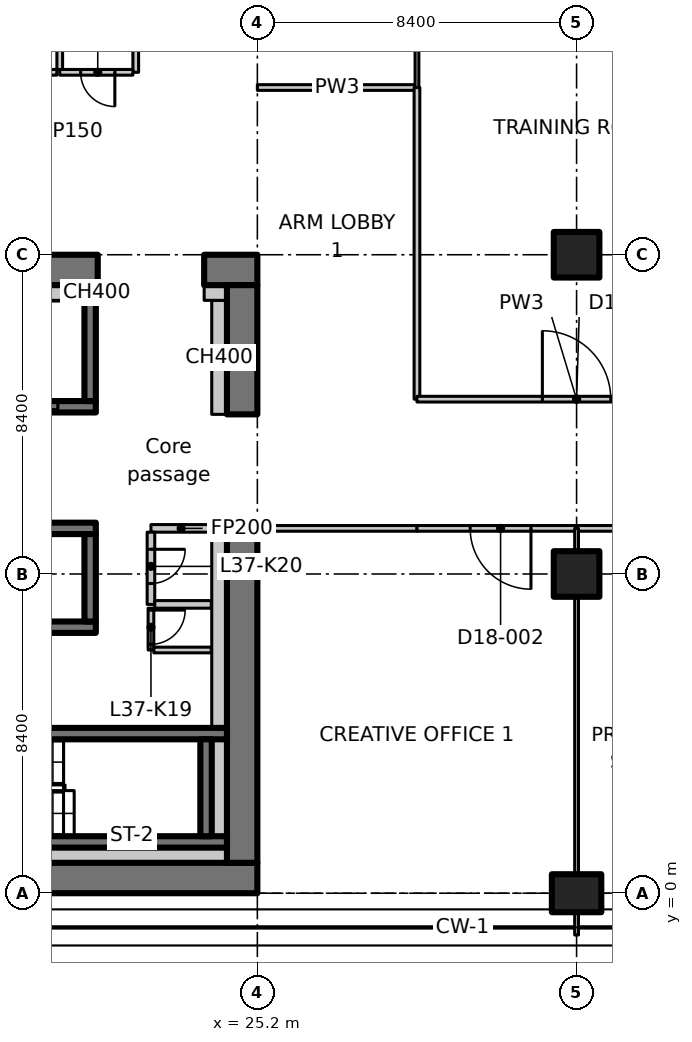
"""IFC4 building model, lengths in metres.
Left out: names, types, materials, properties, quantities, classifications, styles, units other than length and angle.
Written with IfcOpenShell. Run it as: python <this file> out.ifc"""

import sys

from ifc_helpers import new_model, si_unit, direction, frame, frame_2d, origin, origin_2d, place, context, subcontext, project, spatial, polyline, rectangle, outline, extrude, element, fill, save


model = new_model("IFC4")
c1 = context("Model", 3, precision=1e-05, world=origin(), true_north=direction((0.0, 1.0)))
c2 = subcontext(c1, "Body", "Model", "MODEL_VIEW")
j1 = project(units=[si_unit("LENGTHUNIT", "METRE"), si_unit("PLANEANGLEUNIT", "RADIAN")], contexts=[c1])
p1 = place(None, origin())
s1 = spatial("IfcSite", under=j1, at=p1, CompositionType="ELEMENT")
p2 = place(p1, origin())
s2 = spatial("IfcBuilding", under=s1, at=p2, CompositionType="ELEMENT")
p3 = place(p2, frame((0.0, 0.0, 149.3)))
s3 = spatial("IfcBuildingStorey", under=s2, at=p3, CompositionType="ELEMENT", Elevation=149.3)
p4 = place(p3, frame((33.6, 0.0, 0.0), z_axis=(0.0, 0.0, 1.0), x_axis=(0.0, 1.0, 0.0)))
e1 = element("IfcColumn", 1, at=p4, inside=s3, PredefinedType="COLUMN", context=c2, shape_type="SweptSolid", body=[
    extrude(rectangle(XDim=1.0, YDim=1.3, at=origin_2d()), origin(), (0.0, 0.0, 1.0), 3.35),
])
for number, where, z_axis, x_axis in (
    (2, (33.6, 8.4, 0.0), (0.0, 0.0, 1.0), (1.0, 0.0, 0.0)),
    (3, (33.6, 16.8, 0.0), (0.0, 0.0, 1.0), (1.0, 0.0, 0.0)),
):
    element("IfcColumn", number, at=place(p3, frame(where, z_axis=z_axis, x_axis=x_axis)), inside=s3, PredefinedType="COLUMN", context=c2, shape_type="SweptSolid", body=[
        extrude(rectangle(XDim=1.2, YDim=1.2, at=origin_2d()), origin(), (0.0, 0.0, 1.0), 3.35),
    ])
p5 = place(p3, frame((7.136, 0.4, 0.0), z_axis=(0.0, 0.0, 1.0), x_axis=(1.0, 0.0, 0.0)))
e4 = element("IfcWall", 4, at=p5, inside=s3, PredefinedType="SHEAR", context=c2, shape_type="SweptSolid", body=[
    extrude(rectangle(XDim=18.063, YDim=0.8, at=frame_2d((9.032, 0.0))), origin(), (0.0, 0.0, 1.0), 3.35),
])
p6 = place(p3, frame((-1.1, 16.4, 0.0), z_axis=(0.0, 0.0, 1.0), x_axis=(1.0, 0.0, 0.0)))
e5 = element("IfcWall", 5, at=p6, inside=s3, PredefinedType="SHEAR", context=c2, shape_type="SweptSolid", body=[
    extrude(rectangle(XDim=22.1, YDim=0.8, at=frame_2d((11.05, 0.0))), origin(), (0.0, 0.0, 1.0), 3.35),
])
p7 = place(p6, frame((3.15, 0.0, 0.0)))
e6 = element("IfcOpeningElement", 6, at=p7, cuts=e5, PredefinedType="OPENING", context=c2, shape_type="SweptSolid", body=[
    extrude(rectangle(XDim=1.1, YDim=2.3, at=frame_2d((0.55, 1.15))), frame((0.0, 0.41, 0.0), z_axis=(0.0, -1.0, 0.0), x_axis=(1.0, 0.0, 0.0)), (0.0, 0.0, 1.0), 0.82),
])
p8 = place(p3, frame((23.8, 16.4, 0.0), z_axis=(0.0, 0.0, 1.0), x_axis=(1.0, 0.0, 0.0)))
e7 = element("IfcWall", 7, at=p8, inside=s3, PredefinedType="SHEAR", context=c2, shape_type="SweptSolid", body=[
    extrude(rectangle(XDim=1.4, YDim=0.8, at=frame_2d((0.7, 0.0))), origin(), (0.0, 0.0, 1.0), 3.35),
])
p9 = place(p3, frame((24.8, 0.8, 0.0), z_axis=(0.0, 0.0, 1.0), x_axis=(0.0, 1.0, 0.0)))
e8 = element("IfcWall", 8, at=p9, inside=s3, PredefinedType="SHEAR", context=c2, shape_type="SweptSolid", body=[
    extrude(rectangle(XDim=9.0, YDim=0.8, at=frame_2d((4.5, 0.0))), origin(), (0.0, 0.0, 1.0), 3.35),
])
p10 = place(p3, frame((24.8, 12.6, 0.0), z_axis=(0.0, 0.0, 1.0), x_axis=(0.0, 1.0, 0.0)))
e9 = element("IfcWall", 9, at=p10, inside=s3, PredefinedType="SHEAR", context=c2, shape_type="SweptSolid", body=[
    extrude(rectangle(XDim=3.4, YDim=0.8, at=frame_2d((1.7, 0.0))), origin(), (0.0, 0.0, 1.0), 3.35),
])
p11 = place(p3, frame((24.2, 12.6, 0.0), z_axis=(0.0, 0.0, 1.0), x_axis=(0.0, 1.0, 0.0)))
e10 = element("IfcWall", 10, at=p11, inside=s3, PredefinedType="PARTITIONING", context=c2, shape_type="SweptSolid", body=[
    extrude(rectangle(XDim=3.0, YDim=0.4, at=frame_2d((1.5, 0.0))), origin(), (0.0, 0.0, 1.0), 3.35),
])
p12 = place(p3, frame((23.8, 15.8, 0.0), z_axis=(0.0, 0.0, 1.0), x_axis=(1.0, 0.0, 0.0)))
e11 = element("IfcWall", 11, at=p12, inside=s3, PredefinedType="PARTITIONING", context=c2, shape_type="SweptSolid", body=[
    extrude(rectangle(XDim=0.6, YDim=0.4, at=frame_2d((0.3, 0.0))), origin(), (0.0, 0.0, 1.0), 3.35),
])
p13 = place(p3, frame((0.8, 7.0, 0.0), z_axis=(0.0, 0.0, 1.0), x_axis=(1.0, 0.0, 0.0)))
e12 = element("IfcWall", 12, at=p13, inside=s3, PredefinedType="SHEAR", context=c2, shape_type="SweptSolid", body=[
    extrude(rectangle(XDim=20.15, YDim=0.3, at=frame_2d((10.075, 0.0))), origin(), (0.0, 0.0, 1.0), 3.35),
])
p14 = place(p3, frame((0.8, 9.6, 0.0), z_axis=(0.0, 0.0, 1.0), x_axis=(1.0, 0.0, 0.0)))
e13 = element("IfcWall", 13, at=p14, inside=s3, PredefinedType="SHEAR", context=c2, shape_type="SweptSolid", body=[
    extrude(rectangle(XDim=20.15, YDim=0.3, at=frame_2d((10.075, 0.0))), origin(), (0.0, 0.0, 1.0), 3.35),
])
p15 = place(p14, frame((1.25, 0.0, 0.0)))
e14 = element("IfcOpeningElement", 14, at=p15, cuts=e13, PredefinedType="OPENING", context=c2, shape_type="SweptSolid", body=[
    extrude(rectangle(XDim=1.1, YDim=2.3, at=frame_2d((0.55, 1.15))), frame((0.0, 0.16, 0.0), z_axis=(0.0, -1.0, 0.0), x_axis=(1.0, 0.0, 0.0)), (0.0, 0.0, 1.0), 0.32),
])
p16 = place(p14, frame((4.05, 0.0, 0.0)))
e15 = element("IfcOpeningElement", 15, at=p16, cuts=e13, PredefinedType="OPENING", context=c2, shape_type="SweptSolid", body=[
    extrude(rectangle(XDim=1.1, YDim=2.3, at=frame_2d((0.55, 1.15))), frame((0.0, 0.16, 0.0), z_axis=(0.0, -1.0, 0.0), x_axis=(1.0, 0.0, 0.0)), (0.0, 0.0, 1.0), 0.32),
])
p17 = place(p14, frame((6.85, 0.0, 0.0)))
e16 = element("IfcOpeningElement", 16, at=p17, cuts=e13, PredefinedType="OPENING", context=c2, shape_type="SweptSolid", body=[
    extrude(rectangle(XDim=1.1, YDim=2.3, at=frame_2d((0.55, 1.15))), frame((0.0, 0.16, 0.0), z_axis=(0.0, -1.0, 0.0), x_axis=(1.0, 0.0, 0.0)), (0.0, 0.0, 1.0), 0.32),
])
p18 = place(p14, frame((9.65, 0.0, 0.0)))
e17 = element("IfcOpeningElement", 17, at=p18, cuts=e13, PredefinedType="OPENING", context=c2, shape_type="SweptSolid", body=[
    extrude(rectangle(XDim=1.1, YDim=2.3, at=frame_2d((0.55, 1.15))), frame((0.0, 0.16, 0.0), z_axis=(0.0, -1.0, 0.0), x_axis=(1.0, 0.0, 0.0)), (0.0, 0.0, 1.0), 0.32),
])
p19 = place(p14, frame((12.45, 0.0, 0.0)))
e18 = element("IfcOpeningElement", 18, at=p19, cuts=e13, PredefinedType="OPENING", context=c2, shape_type="SweptSolid", body=[
    extrude(rectangle(XDim=1.1, YDim=2.3, at=frame_2d((0.55, 1.15))), frame((0.0, 0.16, 0.0), z_axis=(0.0, -1.0, 0.0), x_axis=(1.0, 0.0, 0.0)), (0.0, 0.0, 1.0), 0.32),
])
p20 = place(p14, frame((15.25, 0.0, 0.0)))
e19 = element("IfcOpeningElement", 19, at=p20, cuts=e13, PredefinedType="OPENING", context=c2, shape_type="SweptSolid", body=[
    extrude(rectangle(XDim=1.1, YDim=2.3, at=frame_2d((0.55, 1.15))), frame((0.0, 0.16, 0.0), z_axis=(0.0, -1.0, 0.0), x_axis=(1.0, 0.0, 0.0)), (0.0, 0.0, 1.0), 0.32),
])
p21 = place(p3, frame((20.8, 7.15, 0.0), z_axis=(0.0, 0.0, 1.0), x_axis=(0.0, 1.0, 0.0)))
e20 = element("IfcWall", 20, at=p21, inside=s3, PredefinedType="SHEAR", context=c2, shape_type="SweptSolid", body=[
    extrude(rectangle(XDim=2.3, YDim=0.3, at=frame_2d((1.15, 0.0))), origin(), (0.0, 0.0, 1.0), 3.35),
])
p22 = place(p3, frame((15.05, 12.8, 0.0), z_axis=(0.0, 0.0, 1.0), x_axis=(1.0, 0.0, 0.0)))
e21 = element("IfcWall", 21, at=p22, inside=s3, PredefinedType="SHEAR", context=c2, shape_type="SweptSolid", body=[
    extrude(rectangle(XDim=5.9, YDim=0.3, at=frame_2d((2.95, 0.0))), origin(), (0.0, 0.0, 1.0), 3.35),
])
p23 = place(p22, frame((3.8, 0.0, 0.0)))
e22 = element("IfcOpeningElement", 22, at=p23, cuts=e21, PredefinedType="OPENING", context=c2, shape_type="SweptSolid", body=[
    extrude(rectangle(XDim=1.1, YDim=2.3, at=frame_2d((0.55, 1.15))), frame((0.0, 0.16, 0.0), z_axis=(0.0, -1.0, 0.0), x_axis=(1.0, 0.0, 0.0)), (0.0, 0.0, 1.0), 0.32),
])
p24 = place(p3, frame((20.8, 12.95, 0.0), z_axis=(0.0, 0.0, 1.0), x_axis=(0.0, 1.0, 0.0)))
e23 = element("IfcWall", 23, at=p24, inside=s3, PredefinedType="SHEAR", context=c2, shape_type="SweptSolid", body=[
    extrude(rectangle(XDim=3.05, YDim=0.3, at=frame_2d((1.525, 0.0))), origin(), (0.0, 0.0, 1.0), 3.35),
])
p25 = place(p3, frame((15.8, 1.35, 0.0), z_axis=(0.0, 0.0, 1.0), x_axis=(1.0, 0.0, 0.0)))
e24 = element("IfcWall", 24, at=p25, inside=s3, PredefinedType="SHEAR", context=c2, shape_type="SweptSolid", body=[
    extrude(rectangle(XDim=8.6, YDim=0.3, at=frame_2d((4.3, 0.0))), origin(), (0.0, 0.0, 1.0), 3.35),
])
p26 = place(p3, frame((15.8, 4.2, 0.0), z_axis=(0.0, 0.0, 1.0), x_axis=(1.0, 0.0, 0.0)))
e25 = element("IfcWall", 25, at=p26, inside=s3, PredefinedType="SHEAR", context=c2, shape_type="SweptSolid", body=[
    extrude(rectangle(XDim=8.6, YDim=0.3, at=frame_2d((4.3, 0.0))), origin(), (0.0, 0.0, 1.0), 3.35),
])
p27 = place(p26, frame((0.4, 0.0, 0.0)))
e26 = element("IfcOpeningElement", 26, at=p27, cuts=e25, PredefinedType="OPENING", context=c2, shape_type="SweptSolid", body=[
    extrude(rectangle(XDim=1.0, YDim=2.1, at=frame_2d((0.5, 1.05))), frame((0.0, 0.16, 0.0), z_axis=(0.0, -1.0, 0.0), x_axis=(1.0, 0.0, 0.0)), (0.0, 0.0, 1.0), 0.32),
])
p28 = place(p3, frame((23.85, 1.5, 0.0), z_axis=(0.0, 0.0, 1.0), x_axis=(0.0, 1.0, 0.0)))
e27 = element("IfcWall", 27, at=p28, inside=s3, PredefinedType="SHEAR", context=c2, shape_type="SweptSolid", body=[
    extrude(rectangle(XDim=2.55, YDim=0.3, at=frame_2d((1.275, 0.0))), origin(), (0.0, 0.0, 1.0), 3.35),
])
p29 = place(p3, frame((23.988, 9.6, 0.0), z_axis=(0.0, 0.0, 1.0), x_axis=(-1.0, 0.0, 0.0)))
e28 = element("IfcWall", 28, at=p29, inside=s3, PredefinedType="PARTITIONING", context=c2, shape_type="SweptSolid", body=[
    extrude(rectangle(XDim=1.588, YDim=0.2, at=frame_2d((0.794, 0.0))), origin(), (0.0, 0.0, 1.0), 3.35),
])
p30 = place(p3, frame((22.4, 9.5, 0.0), z_axis=(0.0, 0.0, 1.0), x_axis=(0.0, -1.0, 0.0)))
e29 = element("IfcWall", 29, at=p30, inside=s3, PredefinedType="PARTITIONING", context=c2, shape_type="SweptSolid", body=[
    extrude(rectangle(XDim=1.9, YDim=0.2, at=frame_2d((0.95, 0.0))), origin(), (0.0, 0.0, 1.0), 3.35),
])
p31 = place(p30, frame((0.45, 0.0, 0.0)))
e30 = element("IfcOpeningElement", 30, at=p31, cuts=e29, PredefinedType="OPENING", context=c2, shape_type="SweptSolid", body=[
    extrude(rectangle(XDim=0.9, YDim=2.1, at=frame_2d((0.45, 1.05))), frame((0.0, 0.11, 0.0), z_axis=(0.0, -1.0, 0.0), x_axis=(1.0, 0.0, 0.0)), (0.0, 0.0, 1.0), 0.22),
])
p32 = place(p3, frame((22.5, 7.6, 0.0), z_axis=(0.0, 0.0, 1.0), x_axis=(1.0, 0.0, 0.0)))
e31 = element("IfcWall", 31, at=p32, inside=s3, PredefinedType="PARTITIONING", context=c2, shape_type="SweptSolid", body=[
    extrude(rectangle(XDim=1.488, YDim=0.2, at=frame_2d((0.744, 0.0))), origin(), (0.0, 0.0, 1.0), 3.35),
])
p33 = place(p3, frame((22.0, 23.925, 0.0), z_axis=(0.0, 0.0, 1.0), x_axis=(0.0, -1.0, 0.0)))
e32 = element("IfcWall", 32, at=p33, inside=s3, PredefinedType="PARTITIONING", context=c2, shape_type="SweptSolid", body=[
    extrude(rectangle(XDim=2.325, YDim=0.15, at=frame_2d((1.163, 0.0))), origin(), (0.0, 0.0, 1.0), 3.35),
])
p34 = place(p3, frame((21.925, 21.6, 0.0), z_axis=(0.0, 0.0, 1.0), x_axis=(-1.0, 0.0, 0.0)))
e33 = element("IfcWall", 33, at=p34, inside=s3, PredefinedType="PARTITIONING", context=c2, shape_type="SweptSolid", body=[
    extrude(rectangle(XDim=1.925, YDim=0.15, at=frame_2d((0.962, 0.0))), origin(), (0.0, 0.0, 1.0), 3.35),
])
p35 = place(p34, frame((0.475, 0.0, 0.0)))
e34 = element("IfcOpeningElement", 34, at=p35, cuts=e33, PredefinedType="OPENING", context=c2, shape_type="SweptSolid", body=[
    extrude(rectangle(XDim=0.9, YDim=2.1, at=frame_2d((0.45, 1.05))), frame((0.0, 0.085, 0.0), z_axis=(0.0, -1.0, 0.0), x_axis=(1.0, 0.0, 0.0)), (0.0, 0.0, 1.0), 0.17),
])
p36 = place(p3, frame((20.0, 21.675, 0.0), z_axis=(0.0, 0.0, 1.0), x_axis=(0.0, 1.0, 0.0)))
e35 = element("IfcWall", 35, at=p36, inside=s3, PredefinedType="PARTITIONING", context=c2, shape_type="SweptSolid", body=[
    extrude(rectangle(XDim=2.25, YDim=0.15, at=frame_2d((1.125, 0.0))), origin(), (0.0, 0.0, 1.0), 3.35),
])
p37 = place(p3, frame((19.925, 21.6, 0.0), z_axis=(0.0, 0.0, 1.0), x_axis=(-1.0, 0.0, 0.0)))
e36 = element("IfcWall", 36, at=p37, inside=s3, PredefinedType="PARTITIONING", context=c2, shape_type="SweptSolid", body=[
    extrude(rectangle(XDim=2.325, YDim=0.15, at=frame_2d((1.163, 0.0))), origin(), (0.0, 0.0, 1.0), 3.35),
])
p38 = place(p37, frame((0.675, 0.0, 0.0)))
e37 = element("IfcOpeningElement", 37, at=p38, cuts=e36, PredefinedType="OPENING", context=c2, shape_type="SweptSolid", body=[
    extrude(rectangle(XDim=0.9, YDim=2.1, at=frame_2d((0.45, 1.05))), frame((0.0, 0.085, 0.0), z_axis=(0.0, -1.0, 0.0), x_axis=(1.0, 0.0, 0.0)), (0.0, 0.0, 1.0), 0.17),
])
p39 = place(p3, frame((22.4, 7.5, 0.0), z_axis=(0.0, 0.0, 1.0), x_axis=(0.0, -1.0, 0.0)))
e38 = element("IfcWall", 38, at=p39, inside=s3, PredefinedType="PARTITIONING", context=c2, shape_type="SweptSolid", body=[
    extrude(rectangle(XDim=1.1, YDim=0.15, at=frame_2d((0.55, 0.0))), origin(), (0.0, 0.0, 1.0), 3.35),
])
p40 = place(p39, frame((0.05, 0.0, 0.0)))
e39 = element("IfcOpeningElement", 39, at=p40, cuts=e38, PredefinedType="OPENING", context=c2, shape_type="SweptSolid", body=[
    extrude(rectangle(XDim=0.9, YDim=2.1, at=frame_2d((0.45, 1.05))), frame((0.0, 0.085, 0.0), z_axis=(0.0, -1.0, 0.0), x_axis=(1.0, 0.0, 0.0)), (0.0, 0.0, 1.0), 0.17),
])
p41 = place(p3, frame((22.475, 6.4, 0.0), z_axis=(0.0, 0.0, 1.0), x_axis=(1.0, 0.0, 0.0)))
e40 = element("IfcWall", 40, at=p41, inside=s3, PredefinedType="PARTITIONING", context=c2, shape_type="SweptSolid", body=[
    extrude(rectangle(XDim=1.513, YDim=0.15, at=frame_2d((0.756, 0.0))), origin(), (0.0, 0.0, 1.0), 3.35),
])
p42 = place(p3, frame((18.15, 15.8, 0.0), z_axis=(0.0, 0.0, 1.0), x_axis=(1.0, 0.0, 0.0)))
e41 = element("IfcWall", 41, at=p42, inside=s3, PredefinedType="PARTITIONING", context=c2, shape_type="SweptSolid", body=[
    extrude(rectangle(XDim=2.5, YDim=0.4, at=frame_2d((1.25, 0.0))), origin(), (0.0, 0.0, 1.0), 3.35),
])
p43 = place(p3, frame((20.95, 15.8, 0.0), z_axis=(0.0, 0.0, 1.0), x_axis=(1.0, 0.0, 0.0)))
e42 = element("IfcWall", 42, at=p43, inside=s3, PredefinedType="PARTITIONING", context=c2, shape_type="SweptSolid", body=[
    extrude(rectangle(XDim=0.05, YDim=0.4, at=frame_2d((0.025, 0.0))), origin(), (0.0, 0.0, 1.0), 3.35),
])
p44 = place(p3, frame((13.35, 1.0, 0.0), z_axis=(0.0, 0.0, 1.0), x_axis=(1.0, 0.0, 0.0)))
e43 = element("IfcWall", 43, at=p44, inside=s3, PredefinedType="PARTITIONING", context=c2, shape_type="SweptSolid", body=[
    extrude(rectangle(XDim=11.05, YDim=0.4, at=frame_2d((5.525, 0.0))), origin(), (0.0, 0.0, 1.0), 3.35),
])
p45 = place(p3, frame((24.2, 1.5, 0.0), z_axis=(0.0, 0.0, 1.0), x_axis=(0.0, 1.0, 0.0)))
e44 = element("IfcWall", 44, at=p45, inside=s3, PredefinedType="PARTITIONING", context=c2, shape_type="SweptSolid", body=[
    extrude(rectangle(XDim=2.55, YDim=0.4, at=frame_2d((1.275, 0.0))), origin(), (0.0, 0.0, 1.0), 3.35),
])
p46 = place(p3, frame((24.2, 4.35, 0.0), z_axis=(0.0, 0.0, 1.0), x_axis=(0.0, 1.0, 0.0)))
e45 = element("IfcWall", 45, at=p46, inside=s3, PredefinedType="PARTITIONING", context=c2, shape_type="SweptSolid", body=[
    extrude(rectangle(XDim=5.45, YDim=0.4, at=frame_2d((2.725, 0.0))), origin(), (0.0, 0.0, 1.0), 3.35),
])
for number, where, z_axis, x_axis in (
    (46, (25.2, 21.2, 0.0), (0.0, 0.0, 1.0), (1.0, 0.0, 0.0)),
    (47, (29.4, 9.6, 0.0), (0.0, 0.0, 1.0), (-1.0, 0.0, 0.0)),
):
    element("IfcWall", number, at=place(p3, frame(where, z_axis=z_axis, x_axis=x_axis)), inside=s3, PredefinedType="PARTITIONING", context=c2, shape_type="SweptSolid", body=[
        extrude(rectangle(XDim=4.2, YDim=0.15, at=frame_2d((2.1, 0.0))), origin(), (0.0, 0.0, 1.0), 3.33),
    ])
p47 = place(p3, frame((29.4, 21.2, 0.0), z_axis=(0.0, 0.0, 1.0), x_axis=(0.0, -1.0, 0.0)))
e48 = element("IfcWall", 48, at=p47, inside=s3, PredefinedType="PARTITIONING", context=c2, shape_type="SweptSolid", body=[
    extrude(rectangle(XDim=8.2, YDim=0.15, at=frame_2d((4.1, 0.0))), origin(), (0.0, 0.0, 1.0), 3.33),
])
p48 = place(p3, frame((29.4, 27.511, 0.0), z_axis=(0.0, 0.0, 1.0), x_axis=(0.0, -1.0, 0.0)))
e49 = element("IfcWall", 49, at=p48, inside=s3, PredefinedType="PARTITIONING", context=c2, shape_type="SweptSolid", body=[
    extrude(outline(polyline([(0.0, 0.0), (6.311, 0.0), (6.311, 3.33), (2.761, 3.33), (2.759, 2.98), (1.863, 2.98), (1.861, 3.33), (0.236, 3.33), (0.0, 3.33), (0.0, 0.0)])), frame((0.0, 0.05, 0.0), z_axis=(0.0, -1.0, 0.0), x_axis=(1.0, 0.0, 0.0)), (0.0, 0.0, 1.0), 0.1),
])
p49 = place(p3, frame((33.6, 9.6, 0.0), z_axis=(0.0, 0.0, 1.0), x_axis=(-1.0, 0.0, 0.0)))
e50 = element("IfcWall", 50, at=p49, inside=s3, PredefinedType="PARTITIONING", context=c2, shape_type="SweptSolid", body=[
    extrude(rectangle(XDim=4.2, YDim=0.15, at=frame_2d((2.1, 0.0))), origin(), (0.0, 0.0, 1.0), 3.33),
])
p50 = place(p49, frame((1.2, 0.0, 0.0)))
e51 = element("IfcOpeningElement", 51, at=p50, cuts=e50, PredefinedType="OPENING", context=c2, shape_type="SweptSolid", body=[
    extrude(rectangle(XDim=1.6, YDim=2.1, at=frame_2d((0.8, 1.05))), frame((0.0, 0.085, 0.0), z_axis=(0.0, -1.0, 0.0), x_axis=(1.0, 0.0, 0.0)), (0.0, 0.0, 1.0), 0.17),
])
p51 = place(p3, frame((37.8, 9.6, 0.0), z_axis=(0.0, 0.0, 1.0), x_axis=(-1.0, 0.0, 0.0)))
e52 = element("IfcWall", 52, at=p51, inside=s3, PredefinedType="PARTITIONING", context=c2, shape_type="SweptSolid", body=[
    extrude(rectangle(XDim=4.2, YDim=0.15, at=frame_2d((2.1, 0.0))), origin(), (0.0, 0.0, 1.0), 3.33),
])
p52 = place(p51, frame((1.5, 0.0, 0.0)))
e53 = element("IfcOpeningElement", 53, at=p52, cuts=e52, PredefinedType="OPENING", context=c2, shape_type="SweptSolid", body=[
    extrude(rectangle(XDim=1.1, YDim=2.1, at=frame_2d((0.55, 1.05))), frame((0.0, 0.085, 0.0), z_axis=(0.0, -1.0, 0.0), x_axis=(1.0, 0.0, 0.0)), (0.0, 0.0, 1.0), 0.17),
])
p53 = place(p3, frame((29.4, 13.0, 0.0), z_axis=(0.0, 0.0, 1.0), x_axis=(1.0, 0.0, 0.0)))
e54 = element("IfcWall", 54, at=p53, inside=s3, PredefinedType="PARTITIONING", context=c2, shape_type="SweptSolid", body=[
    extrude(rectangle(XDim=8.4, YDim=0.15, at=frame_2d((4.2, 0.0))), origin(), (0.0, 0.0, 1.0), 3.33),
])
p54 = place(p53, frame((3.3, 0.0, 0.0)))
e55 = element("IfcOpeningElement", 55, at=p54, cuts=e54, PredefinedType="OPENING", context=c2, shape_type="SweptSolid", body=[
    extrude(rectangle(XDim=1.8, YDim=2.1, at=frame_2d((0.9, 1.05))), frame((0.0, 0.085, 0.0), z_axis=(0.0, -1.0, 0.0), x_axis=(1.0, 0.0, 0.0)), (0.0, 0.0, 1.0), 0.17),
])
p55 = place(p3, frame((33.6, 9.6, 0.0), z_axis=(0.0, 0.0, 1.0), x_axis=(0.0, -1.0, 0.0)))
e56 = element("IfcWall", 56, at=p55, inside=s3, PredefinedType="PARTITIONING", context=c2, shape_type="SweptSolid", body=[
    extrude(rectangle(XDim=0.58, YDim=0.1, at=frame_2d((0.29, 0.0))), origin(), (0.0, 0.0, 1.0), 3.33),
])
p56 = place(p3, frame((33.6, 7.78, 0.0), z_axis=(0.0, 0.0, 1.0), x_axis=(0.0, -1.0, 0.0)))
e57 = element("IfcWall", 57, at=p56, inside=s3, PredefinedType="PARTITIONING", context=c2, shape_type="SweptSolid", body=[
    extrude(rectangle(XDim=7.26, YDim=0.1, at=frame_2d((3.63, 0.0))), origin(), (0.0, 0.0, 1.0), 3.33),
])
p57 = place(p3, frame((33.6, -0.52, 0.0), z_axis=(0.0, 0.0, 1.0), x_axis=(0.0, -1.0, 0.0)))
e58 = element("IfcWall", 58, at=p57, inside=s3, PredefinedType="PARTITIONING", context=c2, shape_type="SweptSolid", body=[
    extrude(rectangle(XDim=0.58, YDim=0.1, at=frame_2d((0.29, 0.0))), origin(), (0.0, 0.0, 1.0), 3.33),
])
p58 = place(p23, origin())
e59 = element("IfcDoor", 59, at=p58, inside=s3, OperationType="SLIDING_TO_LEFT", PredefinedType="DOOR", context=c2, shape_type="SweptSolid", body=[
    extrude(rectangle(XDim=1.1, YDim=2.3, at=frame_2d((0.55, 1.15))), frame((0.0, 0.025, 0.0), z_axis=(0.0, -1.0, 0.0), x_axis=(1.0, 0.0, 0.0)), (0.0, 0.0, 1.0), 0.05),
])
fill(e22, e59)
p59 = place(p40, origin())
e60 = element("IfcDoor", 60, at=p59, inside=s3, OperationType="SINGLE_SWING_LEFT", PredefinedType="DOOR", context=c2, shape_type="SweptSolid", body=[
    extrude(rectangle(XDim=0.9, YDim=2.1, at=frame_2d((0.45, 1.05))), frame((0.0, 0.025, 0.0), z_axis=(0.0, -1.0, 0.0), x_axis=(1.0, 0.0, 0.0)), (0.0, 0.0, 1.0), 0.05),
])
fill(e39, e60)
p60 = place(p31, origin())
e61 = element("IfcDoor", 61, at=p60, inside=s3, OperationType="SINGLE_SWING_RIGHT", PredefinedType="DOOR", context=c2, shape_type="SweptSolid", body=[
    extrude(rectangle(XDim=0.9, YDim=2.1, at=frame_2d((0.45, 1.05))), frame((0.0, 0.025, 0.0), z_axis=(0.0, -1.0, 0.0), x_axis=(1.0, 0.0, 0.0)), (0.0, 0.0, 1.0), 0.05),
])
fill(e30, e61)
p61 = place(p35, origin())
e62 = element("IfcDoor", 62, at=p61, inside=s3, OperationType="SINGLE_SWING_RIGHT", PredefinedType="DOOR", context=c2, shape_type="SweptSolid", body=[
    extrude(rectangle(XDim=0.9, YDim=2.1, at=frame_2d((0.45, 1.05))), frame((0.0, 0.025, 0.0), z_axis=(0.0, -1.0, 0.0), x_axis=(1.0, 0.0, 0.0)), (0.0, 0.0, 1.0), 0.05),
])
fill(e34, e62)
p62 = place(p50, origin())
e63 = element("IfcDoor", 63, at=p62, inside=s3, OperationType="DOUBLE_DOOR_SINGLE_SWING", PredefinedType="DOOR", context=c2, shape_type="SweptSolid", body=[
    extrude(rectangle(XDim=1.6, YDim=2.1, at=frame_2d((0.8, 1.05))), frame((0.0, 0.025, 0.0), z_axis=(0.0, -1.0, 0.0), x_axis=(1.0, 0.0, 0.0)), (0.0, 0.0, 1.0), 0.05),
])
fill(e51, e63)
p63 = place(p54, origin())
e64 = element("IfcDoor", 64, at=p63, inside=s3, OperationType="DOUBLE_DOOR_SINGLE_SWING", PredefinedType="DOOR", context=c2, shape_type="SweptSolid", body=[
    extrude(rectangle(XDim=1.8, YDim=2.1, at=frame_2d((0.9, 1.05))), frame((0.0, 0.025, 0.0), z_axis=(0.0, -1.0, 0.0), x_axis=(1.0, 0.0, 0.0)), (0.0, 0.0, 1.0), 0.05),
])
fill(e55, e64)
save(model, sys.argv[1])
